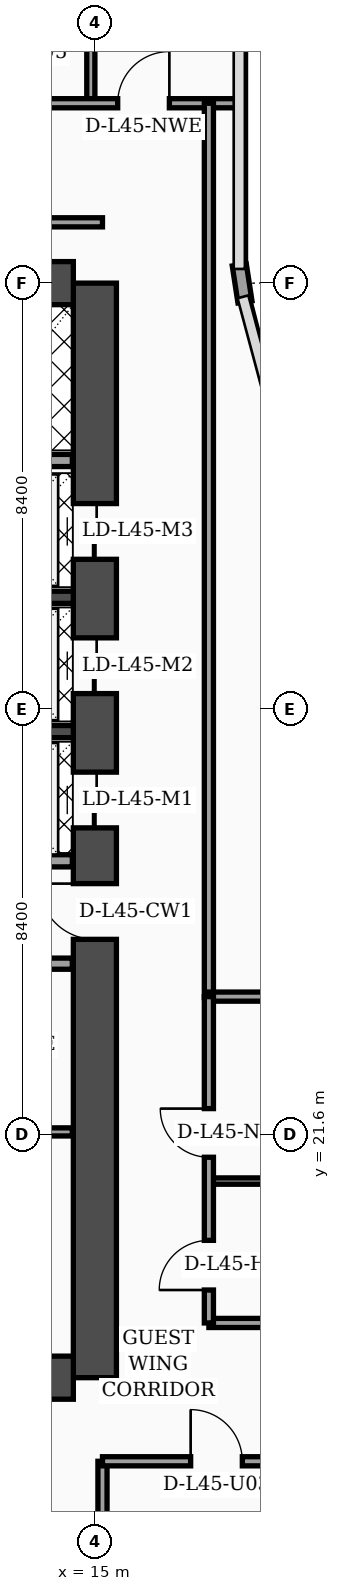
"""IFC4 building model, lengths in metres.
Left out: names, types, materials, properties, quantities, classifications, styles, units other than length and angle.
Written with IfcOpenShell. Run it as: python <this file> out.ifc"""

import sys

from ifc_helpers import new_model, si_unit, direction, frame, frame_2d, origin, place, context, subcontext, project, spatial, rectangle, extrude, element, fill, save


model = new_model("IFC4")
c1 = context("Model", 3, precision=1e-05, world=origin(), true_north=direction((0.0, 1.0)))
c2 = subcontext(c1, "Body", "Model", "MODEL_VIEW")
j1 = project(units=[si_unit("LENGTHUNIT", "METRE"), si_unit("PLANEANGLEUNIT", "RADIAN")], contexts=[c1])
p1 = place(None, origin())
s1 = spatial("IfcSite", under=j1, at=p1, CompositionType="ELEMENT")
p2 = place(p1, origin())
s2 = spatial("IfcBuilding", under=s1, at=p2, CompositionType="ELEMENT")
p3 = place(p2, frame((0.0, 0.0, 182.7)))
s3 = spatial("IfcBuildingStorey", under=s2, at=p3, CompositionType="ELEMENT", Elevation=182.7)
p4 = place(p3, frame((15.0, 16.8, 0.0), z_axis=(0.0, 0.0, 1.0), x_axis=(0.0, 1.0, 0.0)))
e1 = element("IfcWall", 1, at=p4, inside=s3, PredefinedType="SHEAR", context=c2, shape_type="SweptSolid", body=[
    extrude(rectangle(XDim=21.6, YDim=0.85, at=frame_2d((10.8, 0.0))), origin(), (0.0, 0.0, 1.0), 3.52),
])
p5 = place(p4, frame((8.65, 0.0, 0.0)))
e2 = element("IfcOpeningElement", 2, at=p5, cuts=e1, PredefinedType="OPENING", context=c2, shape_type="SweptSolid", body=[
    extrude(rectangle(XDim=1.1, YDim=2.2, at=frame_2d((0.55, 1.1))), frame((0.0, 0.435, 0.0), z_axis=(0.0, -1.0, 0.0), x_axis=(1.0, 0.0, 0.0)), (0.0, 0.0, 1.0), 0.87),
])
p6 = place(p4, frame((10.85, 0.0, 0.0)))
e3 = element("IfcOpeningElement", 3, at=p6, cuts=e1, PredefinedType="OPENING", context=c2, shape_type="SweptSolid", body=[
    extrude(rectangle(XDim=1.1, YDim=2.2, at=frame_2d((0.55, 1.1))), frame((0.0, 0.435, 0.0), z_axis=(0.0, -1.0, 0.0), x_axis=(1.0, 0.0, 0.0)), (0.0, 0.0, 1.0), 0.87),
])
p7 = place(p4, frame((13.5, 0.0, 0.0)))
e4 = element("IfcOpeningElement", 4, at=p7, cuts=e1, PredefinedType="OPENING", context=c2, shape_type="SweptSolid", body=[
    extrude(rectangle(XDim=1.1, YDim=2.2, at=frame_2d((0.55, 1.1))), frame((0.0, 0.435, 0.0), z_axis=(0.0, -1.0, 0.0), x_axis=(1.0, 0.0, 0.0)), (0.0, 0.0, 1.0), 0.87),
])
p8 = place(p4, frame((16.15, 0.0, 0.0)))
e5 = element("IfcOpeningElement", 5, at=p8, cuts=e1, PredefinedType="OPENING", context=c2, shape_type="SweptSolid", body=[
    extrude(rectangle(XDim=1.1, YDim=2.2, at=frame_2d((0.55, 1.1))), frame((0.0, 0.435, 0.0), z_axis=(0.0, -1.0, 0.0), x_axis=(1.0, 0.0, 0.0)), (0.0, 0.0, 1.0), 0.87),
])
for number, where, z_axis, x_axis in (
    (6, (4.625, 38.4, 0.0), (0.0, 0.0, 1.0), (1.0, 0.0, 0.0)),
    (7, (4.625, 16.8, 0.0), (0.0, 0.0, 1.0), (1.0, 0.0, 0.0)),
):
    element("IfcWall", number, at=place(p3, frame(where, z_axis=z_axis, x_axis=x_axis)), inside=s3, PredefinedType="SHEAR", context=c2, shape_type="SweptSolid", body=[
        extrude(rectangle(XDim=9.95, YDim=0.85, at=frame_2d((4.975, 0.0))), origin(), (0.0, 0.0, 1.0), 3.52),
    ])
for number, where, z_axis, x_axis in (
    (8, (12.18, 29.55, 0.0), (0.0, 0.0, 1.0), (1.0, 0.0, 0.0)),
    (9, (12.18, 32.2, 0.0), (0.0, 0.0, 1.0), (1.0, 0.0, 0.0)),
):
    element("IfcWall", number, at=place(p3, frame(where, z_axis=z_axis, x_axis=x_axis)), inside=s3, PredefinedType="SOLIDWALL", context=c2, shape_type="SweptSolid", body=[
        extrude(rectangle(XDim=2.395, YDim=0.24, at=frame_2d((1.198, 0.0))), origin(), (0.0, 0.0, 1.0), 3.52),
    ])
p9 = place(p3, frame((17.962, 38.03, 0.0), z_axis=(0.0, 0.0, 1.0), x_axis=(-0.15141125477, 0.988470855377, 0.0)))
e10 = element("IfcWall", 10, at=p9, inside=s3, PredefinedType="SOLIDWALL", context=c2, shape_type="SweptSolid", body=[
    extrude(rectangle(XDim=0.739, YDim=0.28, at=frame_2d((0.369, 0.0))), origin(), (0.0, 0.0, 1.0), 3.52),
])
p10 = place(p3, frame((9.68, 21.65, 0.0), z_axis=(0.0, 0.0, 1.0), x_axis=(1.0, 0.0, 0.0)))
e11 = element("IfcWall", 11, at=p10, inside=s3, PredefinedType="PARTITIONING", context=c2, shape_type="SweptSolid", body=[
    extrude(rectangle(XDim=4.875, YDim=0.16, at=frame_2d((2.438, 0.0))), origin(), (0.0, 0.0, 1.0), 3.52),
])
p11 = place(p10, frame((1.1, 0.0, 0.0)))
e12 = element("IfcOpeningElement", 12, at=p11, cuts=e11, PredefinedType="OPENING", context=c2, shape_type="SweptSolid", body=[
    extrude(rectangle(XDim=0.98, YDim=2.15, at=frame_2d((0.49, 1.075))), frame((0.0, 0.09, 0.0), z_axis=(0.0, -1.0, 0.0), x_axis=(1.0, 0.0, 0.0)), (0.0, 0.0, 1.0), 0.18),
])
p12 = place(p3, frame((9.68, 24.97, 0.0), z_axis=(0.0, 0.0, 1.0), x_axis=(1.0, 0.0, 0.0)))
e13 = element("IfcWall", 13, at=p12, inside=s3, PredefinedType="SOLIDWALL", context=c2, shape_type="SweptSolid", body=[
    extrude(rectangle(XDim=4.875, YDim=0.22, at=frame_2d((2.438, 0.0))), origin(), (0.0, 0.0, 1.0), 2.92),
])
p13 = place(p12, frame((0.9, 0.0, 0.0)))
e14 = element("IfcOpeningElement", 14, at=p13, cuts=e13, PredefinedType="OPENING", context=c2, shape_type="SweptSolid", body=[
    extrude(rectangle(XDim=0.98, YDim=2.15, at=frame_2d((0.49, 1.075))), frame((0.0, 0.12, 0.0), z_axis=(0.0, -1.0, 0.0), x_axis=(1.0, 0.0, 0.0)), (0.0, 0.0, 1.0), 0.24),
])
p14 = place(p3, frame((12.25, 27.0, 0.0), z_axis=(0.0, 0.0, 1.0), x_axis=(1.0, 0.0, 0.0)))
e15 = element("IfcWall", 15, at=p14, inside=s3, PredefinedType="SOLIDWALL", context=c2, shape_type="SweptSolid", body=[
    extrude(rectangle(XDim=2.305, YDim=0.24, at=frame_2d((1.152, 0.0))), origin(), (0.0, 0.0, 1.0), 3.52),
])
p15 = place(p3, frame((9.66, 34.9, 0.0), z_axis=(0.0, 0.0, 1.0), x_axis=(1.0, 0.0, 0.0)))
e16 = element("IfcWall", 16, at=p15, inside=s3, PredefinedType="SOLIDWALL", context=c2, shape_type="SweptSolid", body=[
    extrude(rectangle(XDim=4.895, YDim=0.24, at=frame_2d((2.448, 0.0))), origin(), (0.0, 0.0, 1.0), 3.52),
])
p16 = place(p3, frame((15.15, 2.44, 0.0), z_axis=(0.0, 0.0, 1.0), x_axis=(0.0, 1.0, 0.0)))
e17 = element("IfcWall", 17, at=p16, inside=s3, PredefinedType="PARTITIONING", context=c2, shape_type="SweptSolid", body=[
    extrude(rectangle(XDim=12.71, YDim=0.18, at=frame_2d((6.355, 0.0))), origin(), (0.0, 0.0, 1.0), 3.02),
])
p17 = place(p3, frame((15.15, 15.15, 0.0), z_axis=(0.0, 0.0, 1.0), x_axis=(1.0, 0.0, 0.0)))
e18 = element("IfcWall", 18, at=p17, inside=s3, PredefinedType="PARTITIONING", context=c2, shape_type="SweptSolid", body=[
    extrude(rectangle(XDim=6.45, YDim=0.18, at=frame_2d((3.225, 0.0))), origin(), (0.0, 0.0, 1.0), 2.47),
])
p18 = place(p17, frame((1.74, 0.0, 0.0)))
e19 = element("IfcOpeningElement", 19, at=p18, cuts=e18, PredefinedType="OPENING", context=c2, shape_type="SweptSolid", body=[
    extrude(rectangle(XDim=1.02, YDim=2.2, at=frame_2d((0.51, 1.1))), frame((0.0, 0.1, 0.0), z_axis=(0.0, -1.0, 0.0), x_axis=(1.0, 0.0, 0.0)), (0.0, 0.0, 1.0), 0.2),
])
p19 = place(p3, frame((14.92, 41.95, 0.0), z_axis=(0.0, 0.0, 1.0), x_axis=(0.0, 1.0, 0.0)))
e20 = element("IfcWall", 20, at=p19, inside=s3, PredefinedType="PARTITIONING", context=c2, shape_type="SweptSolid", body=[
    extrude(rectangle(XDim=5.85, YDim=0.16, at=frame_2d((2.925, 0.0))), origin(), (0.0, 0.0, 1.0), 3.02),
])
p20 = place(p3, frame((0.08, 41.95, 0.0), z_axis=(0.0, 0.0, 1.0), x_axis=(1.0, 0.0, 0.0)))
e21 = element("IfcWall", 21, at=p20, inside=s3, PredefinedType="PARTITIONING", context=c2, shape_type="SweptSolid", body=[
    extrude(rectangle(XDim=17.77, YDim=0.18, at=frame_2d((8.885, 0.0))), origin(), (0.0, 0.0, 1.0), 2.92),
])
p21 = place(p20, frame((0.9, 0.0, 0.0)))
e22 = element("IfcOpeningElement", 22, at=p21, cuts=e21, PredefinedType="OPENING", context=c2, shape_type="SweptSolid", body=[
    extrude(rectangle(XDim=1.02, YDim=2.2, at=frame_2d((0.51, 1.1))), frame((0.0, 0.1, 0.0), z_axis=(0.0, -1.0, 0.0), x_axis=(1.0, 0.0, 0.0)), (0.0, 0.0, 1.0), 0.2),
])
p22 = place(p20, frame((4.04, 0.0, 0.0)))
e23 = element("IfcOpeningElement", 23, at=p22, cuts=e21, PredefinedType="OPENING", context=c2, shape_type="SweptSolid", body=[
    extrude(rectangle(XDim=1.02, YDim=2.2, at=frame_2d((0.51, 1.1))), frame((0.0, 0.1, 0.0), z_axis=(0.0, -1.0, 0.0), x_axis=(1.0, 0.0, 0.0)), (0.0, 0.0, 1.0), 0.2),
])
p23 = place(p20, frame((9.92, 0.0, 0.0)))
e24 = element("IfcOpeningElement", 24, at=p23, cuts=e21, PredefinedType="OPENING", context=c2, shape_type="SweptSolid", body=[
    extrude(rectangle(XDim=1.02, YDim=2.2, at=frame_2d((0.51, 1.1))), frame((0.0, 0.1, 0.0), z_axis=(0.0, -1.0, 0.0), x_axis=(1.0, 0.0, 0.0)), (0.0, 0.0, 1.0), 0.2),
])
p24 = place(p20, frame((15.37, 0.0, 0.0)))
e25 = element("IfcOpeningElement", 25, at=p24, cuts=e21, PredefinedType="OPENING", context=c2, shape_type="SweptSolid", body=[
    extrude(rectangle(XDim=1.02, YDim=2.2, at=frame_2d((0.51, 1.1))), frame((0.0, 0.1, 0.0), z_axis=(0.0, -1.0, 0.0), x_axis=(1.0, 0.0, 0.0)), (0.0, 0.0, 1.0), 0.2),
])
p25 = place(p3, frame((17.25, 24.3, 0.0), z_axis=(0.0, 0.0, 1.0), x_axis=(0.0, 1.0, 0.0)))
e26 = element("IfcWall", 26, at=p25, inside=s3, PredefinedType="PARTITIONING", context=c2, shape_type="SweptSolid", body=[
    extrude(rectangle(XDim=17.65, YDim=0.18, at=frame_2d((8.825, 0.0))), origin(), (0.0, 0.0, 1.0), 2.92),
])
p26 = place(p3, frame((3.755, 39.6, 0.0), z_axis=(0.0, 0.0, 1.0), x_axis=(1.0, 0.0, 0.0)))
e27 = element("IfcWall", 27, at=p26, inside=s3, PredefinedType="PARTITIONING", context=c2, shape_type="SweptSolid", body=[
    extrude(rectangle(XDim=11.395, YDim=0.18, at=frame_2d((5.698, 0.0))), origin(), (0.0, 0.0, 1.0), 2.92),
])
p27 = place(p3, frame((17.25, 17.88, 0.0), z_axis=(0.0, 0.0, 1.0), x_axis=(1.0, 0.0, 0.0)))
e28 = element("IfcWall", 28, at=p27, inside=s3, PredefinedType="PARTITIONING", context=c2, shape_type="SweptSolid", body=[
    extrude(rectangle(XDim=4.3, YDim=0.18, at=frame_2d((2.15, 0.0))), origin(), (0.0, 0.0, 1.0), 3.52),
])
p28 = place(p3, frame((17.25, 20.68, 0.0), z_axis=(0.0, 0.0, 1.0), x_axis=(1.0, 0.0, 0.0)))
e29 = element("IfcWall", 29, at=p28, inside=s3, PredefinedType="PARTITIONING", context=c2, shape_type="SweptSolid", body=[
    extrude(rectangle(XDim=4.3, YDim=0.125, at=frame_2d((2.15, 0.0))), origin(), (0.0, 0.0, 1.0), 3.52),
])
p29 = place(p3, frame((17.25, 24.32, 0.0), z_axis=(0.0, 0.0, 1.0), x_axis=(1.0, 0.0, 0.0)))
e30 = element("IfcWall", 30, at=p29, inside=s3, PredefinedType="PARTITIONING", context=c2, shape_type="SweptSolid", body=[
    extrude(rectangle(XDim=4.35, YDim=0.18, at=frame_2d((2.175, 0.0))), origin(), (0.0, 0.0, 1.0), 3.52),
])
p30 = place(p3, frame((17.25, 17.88, 0.0), z_axis=(0.0, 0.0, 1.0), x_axis=(0.0, 1.0, 0.0)))
e31 = element("IfcWall", 31, at=p30, inside=s3, PredefinedType="PARTITIONING", context=c2, shape_type="SweptSolid", body=[
    extrude(rectangle(XDim=6.44, YDim=0.18, at=frame_2d((3.22, 0.0))), origin(), (0.0, 0.0, 1.0), 3.52),
])
p31 = place(p30, frame((0.65, 0.0, 0.0)))
e32 = element("IfcOpeningElement", 32, at=p31, cuts=e31, PredefinedType="OPENING", context=c2, shape_type="SweptSolid", body=[
    extrude(rectangle(XDim=0.98, YDim=2.15, at=frame_2d((0.49, 1.075))), frame((0.0, 0.1, 0.0), z_axis=(0.0, -1.0, 0.0), x_axis=(1.0, 0.0, 0.0)), (0.0, 0.0, 1.0), 0.2),
])
p32 = place(p30, frame((3.27, 0.0, 0.0)))
e33 = element("IfcOpeningElement", 33, at=p32, cuts=e31, PredefinedType="OPENING", context=c2, shape_type="SweptSolid", body=[
    extrude(rectangle(XDim=0.96, YDim=2.2, at=frame_2d((0.48, 1.1))), frame((0.0, 0.1, 0.0), z_axis=(0.0, -1.0, 0.0), x_axis=(1.0, 0.0, 0.0)), (0.0, 0.0, 1.0), 0.2),
])
p33 = place(p18, origin())
e34 = element("IfcDoor", 34, at=p33, inside=s3, OperationType="SINGLE_SWING_LEFT", PredefinedType="DOOR", context=c2, shape_type="SweptSolid", body=[
    extrude(rectangle(XDim=1.02, YDim=2.2, at=frame_2d((0.51, 1.1))), frame((0.0, 0.025, 0.0), z_axis=(0.0, -1.0, 0.0), x_axis=(1.0, 0.0, 0.0)), (0.0, 0.0, 1.0), 0.05),
])
fill(e19, e34)
p34 = place(p24, origin())
e35 = element("IfcDoor", 35, at=p34, inside=s3, OperationType="SINGLE_SWING_RIGHT", PredefinedType="DOOR", context=c2, shape_type="SweptSolid", body=[
    extrude(rectangle(XDim=1.02, YDim=2.2, at=frame_2d((0.51, 1.1))), frame((0.0, 0.025, 0.0), z_axis=(0.0, -1.0, 0.0), x_axis=(1.0, 0.0, 0.0)), (0.0, 0.0, 1.0), 0.05),
])
fill(e25, e35)
p35 = place(p31, origin())
e36 = element("IfcDoor", 36, at=p35, inside=s3, OperationType="SINGLE_SWING_LEFT", PredefinedType="DOOR", context=c2, shape_type="SweptSolid", body=[
    extrude(rectangle(XDim=0.98, YDim=2.15, at=frame_2d((0.49, 1.075))), frame((0.0, 0.025, 0.0), z_axis=(0.0, -1.0, 0.0), x_axis=(1.0, 0.0, 0.0)), (0.0, 0.0, 1.0), 0.05),
])
fill(e32, e36)
p36 = place(p32, origin())
e37 = element("IfcDoor", 37, at=p36, inside=s3, OperationType="SINGLE_SWING_RIGHT", PredefinedType="DOOR", context=c2, shape_type="SweptSolid", body=[
    extrude(rectangle(XDim=0.96, YDim=2.2, at=frame_2d((0.48, 1.1))), frame((0.0, 0.025, 0.0), z_axis=(0.0, -1.0, 0.0), x_axis=(1.0, 0.0, 0.0)), (0.0, 0.0, 1.0), 0.05),
])
fill(e33, e37)
p37 = place(p5, origin())
e38 = element("IfcDoor", 38, at=p37, inside=s3, OperationType="SINGLE_SWING_RIGHT", PredefinedType="DOOR", context=c2, shape_type="SweptSolid", body=[
    extrude(rectangle(XDim=1.1, YDim=2.2, at=frame_2d((0.55, 1.1))), frame((0.0, 0.025, 0.0), z_axis=(0.0, -1.0, 0.0), x_axis=(1.0, 0.0, 0.0)), (0.0, 0.0, 1.0), 0.05),
])
fill(e2, e38)
p38 = place(p6, origin())
e39 = element("IfcDoor", 39, at=p38, inside=s3, OperationType="DOUBLE_DOOR_SLIDING", PredefinedType="DOOR", context=c2, shape_type="SweptSolid", body=[
    extrude(rectangle(XDim=1.1, YDim=2.2, at=frame_2d((0.55, 1.1))), frame((0.0, 0.025, 0.0), z_axis=(0.0, -1.0, 0.0), x_axis=(1.0, 0.0, 0.0)), (0.0, 0.0, 1.0), 0.05),
])
fill(e3, e39)
p39 = place(p7, origin())
e40 = element("IfcDoor", 40, at=p39, inside=s3, OperationType="DOUBLE_DOOR_SLIDING", PredefinedType="DOOR", context=c2, shape_type="SweptSolid", body=[
    extrude(rectangle(XDim=1.1, YDim=2.2, at=frame_2d((0.55, 1.1))), frame((0.0, 0.025, 0.0), z_axis=(0.0, -1.0, 0.0), x_axis=(1.0, 0.0, 0.0)), (0.0, 0.0, 1.0), 0.05),
])
fill(e4, e40)
p40 = place(p8, origin())
e41 = element("IfcDoor", 41, at=p40, inside=s3, OperationType="DOUBLE_DOOR_SLIDING", PredefinedType="DOOR", context=c2, shape_type="SweptSolid", body=[
    extrude(rectangle(XDim=1.1, YDim=2.2, at=frame_2d((0.55, 1.1))), frame((0.0, 0.025, 0.0), z_axis=(0.0, -1.0, 0.0), x_axis=(1.0, 0.0, 0.0)), (0.0, 0.0, 1.0), 0.05),
])
fill(e5, e41)
save(model, sys.argv[1])
